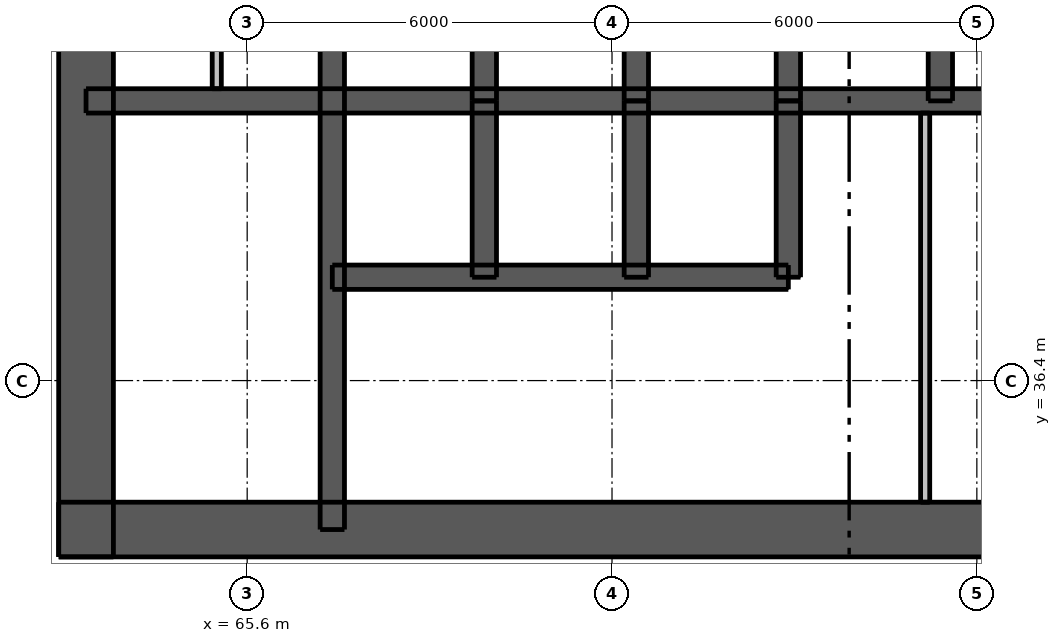
"""IFC4 building model, lengths in metres.
Left out: names, types, materials, properties, quantities, classifications, styles, units other than length and angle.
Written with IfcOpenShell. Run it as: python <this file> out.ifc"""

import sys

from ifc_helpers import new_model, si_unit, direction, frame, frame_2d, origin, place, context, subcontext, project, spatial, rectangle, extrude, element, fill, save


model = new_model("IFC4")
c1 = context("Model", 3, precision=1e-05, world=origin(), true_north=direction((0.0, 1.0)))
c2 = subcontext(c1, "Body", "Model", "MODEL_VIEW")
j1 = project(units=[si_unit("LENGTHUNIT", "METRE"), si_unit("PLANEANGLEUNIT", "RADIAN")], contexts=[c1])
p1 = place(None, origin())
s1 = spatial("IfcSite", under=j1, at=p1, CompositionType="ELEMENT")
p2 = place(p1, origin())
s2 = spatial("IfcBuilding", under=s1, at=p2, CompositionType="ELEMENT")
p3 = place(p2, frame((0.0, 0.0, 40.0)))
s3 = spatial("IfcBuildingStorey", under=s2, at=p3, CompositionType="ELEMENT", Elevation=40.0)
p4 = place(p3, frame((62.5, 33.95, 0.0), z_axis=(0.0, 0.0, 1.0), x_axis=(1.0, 0.0, 0.0)))
e1 = element("IfcWall", 1, at=p4, inside=s3, PredefinedType="SHEAR", context=c2, shape_type="SweptSolid", body=[
    extrude(rectangle(XDim=24.0, YDim=0.9, at=frame_2d((12.0, 0.0))), origin(), (0.0, 0.0, 1.0), 3.05),
])
p5 = place(p4, frame((2.05, 0.0, 0.0)))
e2 = element("IfcOpeningElement", 2, at=p5, cuts=e1, PredefinedType="OPENING", context=c2, shape_type="SweptSolid", body=[
    extrude(rectangle(XDim=1.1, YDim=2.1, at=frame_2d((0.55, 1.05))), frame((0.0, 0.46, 0.0), z_axis=(0.0, -1.0, 0.0), x_axis=(1.0, 0.0, 0.0)), (0.0, 0.0, 1.0), 0.92),
])
p6 = place(p4, frame((20.85, 0.0, 0.0)))
e3 = element("IfcOpeningElement", 3, at=p6, cuts=e1, PredefinedType="OPENING", context=c2, shape_type="SweptSolid", body=[
    extrude(rectangle(XDim=1.1, YDim=2.1, at=frame_2d((0.55, 1.05))), frame((0.0, 0.46, 0.0), z_axis=(0.0, -1.0, 0.0), x_axis=(1.0, 0.0, 0.0)), (0.0, 0.0, 1.0), 0.92),
])
p7 = place(p4, frame((8.0, 0.0, 0.0)))
e4 = element("IfcOpeningElement", 4, at=p7, cuts=e1, PredefinedType="OPENING", context=c2, shape_type="SweptSolid", body=[
    extrude(rectangle(XDim=1.1, YDim=2.1, at=frame_2d((0.55, 1.05))), frame((0.0, 0.46, 0.0), z_axis=(0.0, -1.0, 0.0), x_axis=(1.0, 0.0, 0.0)), (0.0, 0.0, 1.0), 0.92),
])
p8 = place(p4, frame((16.363, 0.0, 0.0)))
e5 = element("IfcOpeningElement", 5, at=p8, cuts=e1, PredefinedType="OPENING", context=c2, shape_type="SweptSolid", body=[
    extrude(rectangle(XDim=0.9, YDim=2.1, at=frame_2d((0.45, 1.05))), frame((0.0, 0.46, 0.0), z_axis=(0.0, -1.0, 0.0), x_axis=(1.0, 0.0, 0.0)), (0.0, 0.0, 1.0), 0.92),
])
p9 = place(p3, frame((62.95, 33.5, 0.0), z_axis=(0.0, 0.0, 1.0), x_axis=(0.0, 1.0, 0.0)))
e6 = element("IfcWall", 6, at=p9, inside=s3, PredefinedType="SHEAR", context=c2, shape_type="SweptSolid", body=[
    extrude(rectangle(XDim=24.0, YDim=0.9, at=frame_2d((12.0, 0.0))), origin(), (0.0, 0.0, 1.0), 3.05),
])
p10 = place(p9, frame((11.2, 0.0, 0.0)))
e7 = element("IfcOpeningElement", 7, at=p10, cuts=e6, PredefinedType="OPENING", context=c2, shape_type="SweptSolid", body=[
    extrude(rectangle(XDim=1.6, YDim=2.1, at=frame_2d((0.8, 1.05))), frame((0.0, 0.46, 0.0), z_axis=(0.0, -1.0, 0.0), x_axis=(1.0, 0.0, 0.0)), (0.0, 0.0, 1.0), 0.92),
])
p11 = place(p3, frame((62.95, 41.0, 0.0), z_axis=(0.0, 0.0, 1.0), x_axis=(1.0, 0.0, 0.0)))
e8 = element("IfcWall", 8, at=p11, inside=s3, PredefinedType="SHEAR", context=c2, shape_type="SweptSolid", body=[
    extrude(rectangle(XDim=23.1, YDim=0.4, at=frame_2d((11.55, 0.0))), origin(), (0.0, 0.0, 1.0), 3.05),
])
p12 = place(p3, frame((67.0, 33.95, 0.0), z_axis=(0.0, 0.0, 1.0), x_axis=(0.0, 1.0, 0.0)))
e9 = element("IfcWall", 9, at=p12, inside=s3, PredefinedType="SHEAR", context=c2, shape_type="SweptSolid", body=[
    extrude(rectangle(XDim=9.95, YDim=0.4, at=frame_2d((4.975, 0.0))), origin(), (0.0, 0.0, 1.0), 3.05),
])
p13 = place(p12, frame((0.65, 0.0, 0.0)))
e10 = element("IfcOpeningElement", 10, at=p13, cuts=e9, PredefinedType="OPENING", context=c2, shape_type="SweptSolid", body=[
    extrude(rectangle(XDim=1.1, YDim=2.1, at=frame_2d((0.55, 1.05))), frame((0.0, 0.21, 0.0), z_axis=(0.0, -1.0, 0.0), x_axis=(1.0, 0.0, 0.0)), (0.0, 0.0, 1.0), 0.42),
])
for number, where, z_axis, x_axis in (
    (11, (69.5, 41.0, 0.0), (0.0, 0.0, 1.0), (0.0, 1.0, 0.0)),
    (12, (72.0, 41.0, 0.0), (0.0, 0.0, 1.0), (0.0, 1.0, 0.0)),
    (13, (74.5, 41.0, 0.0), (0.0, 0.0, 1.0), (0.0, 1.0, 0.0)),
    (14, (77.0, 41.0, 0.0), (0.0, 0.0, 1.0), (0.0, 1.0, 0.0)),
):
    element("IfcWall", number, at=place(p3, frame(where, z_axis=z_axis, x_axis=x_axis)), inside=s3, PredefinedType="SHEAR", context=c2, shape_type="SweptSolid", body=[
        extrude(rectangle(XDim=2.9, YDim=0.4, at=frame_2d((1.45, 0.0))), origin(), (0.0, 0.0, 1.0), 3.05),
    ])
p14 = place(p3, frame((67.0, 38.1, 0.0), z_axis=(0.0, 0.0, 1.0), x_axis=(1.0, 0.0, 0.0)))
e15 = element("IfcWall", 15, at=p14, inside=s3, PredefinedType="SHEAR", context=c2, shape_type="SweptSolid", body=[
    extrude(rectangle(XDim=7.5, YDim=0.4, at=frame_2d((3.75, 0.0))), origin(), (0.0, 0.0, 1.0), 3.05),
])
p15 = place(p14, frame((0.7, 0.0, 0.0)))
e16 = element("IfcOpeningElement", 16, at=p15, cuts=e15, PredefinedType="OPENING", context=c2, shape_type="SweptSolid", body=[
    extrude(rectangle(XDim=1.1, YDim=2.1, at=frame_2d((0.55, 1.05))), frame((0.0, 0.21, 0.0), z_axis=(0.0, -1.0, 0.0), x_axis=(1.0, 0.0, 0.0)), (0.0, 0.0, 1.0), 0.42),
])
p16 = place(p14, frame((3.2, 0.0, 0.0)))
e17 = element("IfcOpeningElement", 17, at=p16, cuts=e15, PredefinedType="OPENING", context=c2, shape_type="SweptSolid", body=[
    extrude(rectangle(XDim=1.1, YDim=2.1, at=frame_2d((0.55, 1.05))), frame((0.0, 0.21, 0.0), z_axis=(0.0, -1.0, 0.0), x_axis=(1.0, 0.0, 0.0)), (0.0, 0.0, 1.0), 0.42),
])
p17 = place(p14, frame((5.65, 0.0, 0.0)))
e18 = element("IfcOpeningElement", 18, at=p17, cuts=e15, PredefinedType="OPENING", context=c2, shape_type="SweptSolid", body=[
    extrude(rectangle(XDim=1.2, YDim=2.1, at=frame_2d((0.6, 1.05))), frame((0.0, 0.21, 0.0), z_axis=(0.0, -1.0, 0.0), x_axis=(1.0, 0.0, 0.0)), (0.0, 0.0, 1.0), 0.42),
])
for number, where, z_axis, x_axis in (
    (19, (69.5, 38.1, 0.0), (0.0, 0.0, 1.0), (0.0, 1.0, 0.0)),
    (20, (72.0, 38.1, 0.0), (0.0, 0.0, 1.0), (0.0, 1.0, 0.0)),
    (21, (74.5, 38.1, 0.0), (0.0, 0.0, 1.0), (0.0, 1.0, 0.0)),
):
    element("IfcWall", number, at=place(p3, frame(where, z_axis=z_axis, x_axis=x_axis)), inside=s3, PredefinedType="SHEAR", context=c2, shape_type="SweptSolid", body=[
        extrude(rectangle(XDim=2.9, YDim=0.4, at=frame_2d((1.45, 0.0))), origin(), (0.0, 0.0, 1.0), 3.05),
    ])
p18 = place(p3, frame((76.75, 34.4, 0.0), z_axis=(0.0, 0.0, 1.0), x_axis=(0.0, 1.0, 0.0)))
e22 = element("IfcWall", 22, at=p18, inside=s3, PredefinedType="PLUMBINGWALL", context=c2, shape_type="SweptSolid", body=[
    extrude(rectangle(XDim=6.4, YDim=0.15, at=frame_2d((3.2, 0.0))), origin(), (0.0, 0.0, 1.0), 3.05),
])
p19 = place(p3, frame((65.1, 41.2, 0.0), z_axis=(0.0, 0.0, 1.0), x_axis=(0.0, 1.0, 0.0)))
e23 = element("IfcWall", 23, at=p19, inside=s3, PredefinedType="PLUMBINGWALL", context=c2, shape_type="SweptSolid", body=[
    extrude(rectangle(XDim=2.5, YDim=0.15, at=frame_2d((1.25, 0.0))), origin(), (0.0, 0.0, 1.0), 3.05),
])
p20 = place(p5, origin())
e24 = element("IfcDoor", 24, at=p20, inside=s3, OperationType="SINGLE_SWING_LEFT", PredefinedType="DOOR", context=c2, shape_type="SweptSolid", body=[
    extrude(rectangle(XDim=1.1, YDim=2.1, at=frame_2d((0.55, 1.05))), frame((0.0, 0.438, 0.0), z_axis=(0.0, -1.0, 0.0), x_axis=(1.0, 0.0, 0.0)), (0.0, 0.0, 1.0), 0.05),
])
fill(e2, e24)
p21 = place(p7, origin())
e25 = element("IfcDoor", 25, at=p21, inside=s3, OperationType="SINGLE_SWING_LEFT", PredefinedType="DOOR", context=c2, shape_type="SweptSolid", body=[
    extrude(rectangle(XDim=1.1, YDim=2.1, at=frame_2d((0.55, 1.05))), frame((0.0, 0.438, 0.0), z_axis=(0.0, -1.0, 0.0), x_axis=(1.0, 0.0, 0.0)), (0.0, 0.0, 1.0), 0.05),
])
fill(e4, e25)
p22 = place(p13, origin())
e26 = element("IfcDoor", 26, at=p22, inside=s3, OperationType="SINGLE_SWING_RIGHT", PredefinedType="DOOR", context=c2, shape_type="SweptSolid", body=[
    extrude(rectangle(XDim=1.1, YDim=2.1, at=frame_2d((0.55, 1.05))), frame((0.0, -0.138, 0.0), z_axis=(0.0, -1.0, 0.0), x_axis=(1.0, 0.0, 0.0)), (0.0, 0.0, 1.0), 0.05),
])
fill(e10, e26)
p23 = place(p15, origin())
e27 = element("IfcDoor", 27, at=p23, inside=s3, OperationType="DOUBLE_DOOR_SLIDING", PredefinedType="DOOR", context=c2, shape_type="SweptSolid", body=[
    extrude(rectangle(XDim=1.1, YDim=2.1, at=frame_2d((0.55, 1.05))), frame((0.0, 0.025, 0.0), z_axis=(0.0, -1.0, 0.0), x_axis=(1.0, 0.0, 0.0)), (0.0, 0.0, 1.0), 0.05),
])
fill(e16, e27)
p24 = place(p16, origin())
e28 = element("IfcDoor", 28, at=p24, inside=s3, OperationType="DOUBLE_DOOR_SLIDING", PredefinedType="DOOR", context=c2, shape_type="SweptSolid", body=[
    extrude(rectangle(XDim=1.1, YDim=2.1, at=frame_2d((0.55, 1.05))), frame((0.0, 0.025, 0.0), z_axis=(0.0, -1.0, 0.0), x_axis=(1.0, 0.0, 0.0)), (0.0, 0.0, 1.0), 0.05),
])
fill(e17, e28)
p25 = place(p17, origin())
e29 = element("IfcDoor", 29, at=p25, inside=s3, OperationType="DOUBLE_DOOR_SLIDING", PredefinedType="DOOR", context=c2, shape_type="SweptSolid", body=[
    extrude(rectangle(XDim=1.2, YDim=2.1, at=frame_2d((0.6, 1.05))), frame((0.0, 0.025, 0.0), z_axis=(0.0, -1.0, 0.0), x_axis=(1.0, 0.0, 0.0)), (0.0, 0.0, 1.0), 0.05),
])
fill(e18, e29)
save(model, sys.argv[1])
